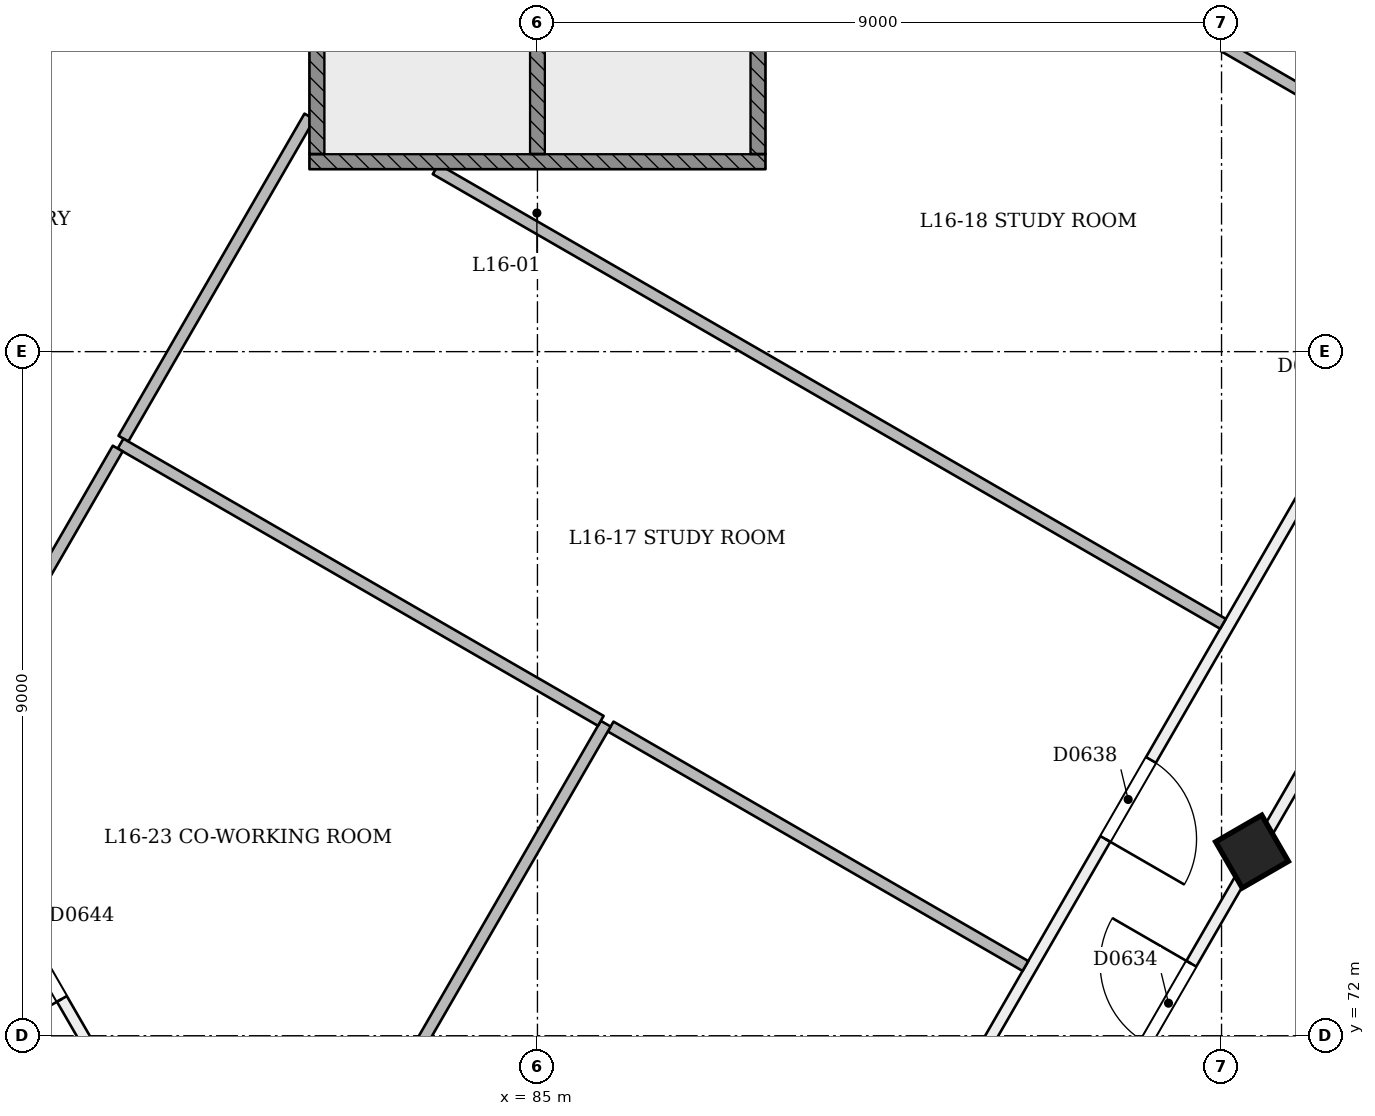
"""IFC4 building model, lengths in metres.
Left out: names, types, materials, properties, quantities, classifications, styles, units other than length and angle.
Written with IfcOpenShell. Run it as: python <this file> out.ifc"""

import sys

from ifc_helpers import new_model, si_unit, direction, frame, frame_2d, origin, origin_2d, place, context, subcontext, project, spatial, rectangle, extrude, element, fill, save


model = new_model("IFC4")
c1 = context("Model", 3, precision=1e-05, world=origin(), true_north=direction((0.0, 1.0)))
c2 = subcontext(c1, "Body", "Model", "MODEL_VIEW")
j1 = project(units=[si_unit("LENGTHUNIT", "METRE"), si_unit("PLANEANGLEUNIT", "RADIAN")], contexts=[c1])
p1 = place(None, origin())
s1 = spatial("IfcSite", under=j1, at=p1, CompositionType="ELEMENT")
p2 = place(p1, origin())
s2 = spatial("IfcBuilding", under=s1, at=p2, CompositionType="ELEMENT")
p3 = place(p2, frame((0.0, 0.0, 66.6)))
s3 = spatial("IfcBuildingStorey", under=s2, at=p3, CompositionType="ELEMENT", Elevation=66.6)
p4 = place(p3, frame((94.428, 74.376, -0.021), z_axis=(-0.022222852987, 0.038483477124, 0.999012095419), x_axis=(-0.500174596178, -0.865639456654, 0.022219460416)))
e1 = element("IfcColumn", 1, at=p4, inside=s3, PredefinedType="COLUMN", context=c2, shape_type="SweptSolid", body=[
    extrude(rectangle(XDim=0.7, YDim=0.7, at=origin_2d()), origin(), (0.0, 0.0, 1.0), 3.604),
])
p5 = place(p3, frame((62.458, 97.093, 0.0), z_axis=(0.0, 0.0, 1.0), x_axis=(0.499998802074, -0.866026095406, 0.0)))
e2 = element("IfcWall", 2, at=p5, inside=s3, PredefinedType="PARTITIONING", context=c2, shape_type="SweptSolid", body=[
    extrude(rectangle(XDim=43.437, YDim=0.15, at=frame_2d((21.719, 0.0))), origin(), (0.0, 0.0, 1.0), 2.7),
])
p6 = place(p5, frame((0.286, 0.0, 0.0)))
e3 = element("IfcOpeningElement", 3, at=p6, cuts=e2, PredefinedType="OPENING", context=c2, shape_type="SweptSolid", body=[
    extrude(rectangle(XDim=1.2, YDim=2.1, at=frame_2d((0.6, 1.05))), frame((0.0, 0.085, 0.0), z_axis=(0.0, -1.0, 0.0), x_axis=(1.0, 0.0, 0.0)), (0.0, 0.0, 1.0), 0.171),
])
p7 = place(p5, frame((12.13, 0.0, 0.0)))
e4 = element("IfcOpeningElement", 4, at=p7, cuts=e2, PredefinedType="OPENING", context=c2, shape_type="SweptSolid", body=[
    extrude(rectangle(XDim=1.2, YDim=2.1, at=frame_2d((0.6, 1.05))), frame((0.0, 0.085, 0.0), z_axis=(0.0, -1.0, 0.0), x_axis=(1.0, 0.0, 0.0)), (0.0, 0.0, 1.0), 0.171),
])
p8 = place(p5, frame((18.98, 0.0, 0.0)))
e5 = element("IfcOpeningElement", 5, at=p8, cuts=e2, PredefinedType="OPENING", context=c2, shape_type="SweptSolid", body=[
    extrude(rectangle(XDim=1.0, YDim=2.1, at=frame_2d((0.5, 1.05))), frame((0.0, 0.085, 0.0), z_axis=(0.0, -1.0, 0.0), x_axis=(1.0, 0.0, 0.0)), (0.0, 0.0, 1.0), 0.171),
])
p9 = place(p5, frame((27.88, 0.0, 0.0)))
e6 = element("IfcOpeningElement", 6, at=p9, cuts=e2, PredefinedType="OPENING", context=c2, shape_type="SweptSolid", body=[
    extrude(rectangle(XDim=1.2, YDim=2.1, at=frame_2d((0.6, 1.05))), frame((0.0, 0.085, 0.0), z_axis=(0.0, -1.0, 0.0), x_axis=(1.0, 0.0, 0.0)), (0.0, 0.0, 1.0), 0.171),
])
p10 = place(p5, frame((38.745, 0.0, 0.0)))
e7 = element("IfcOpeningElement", 7, at=p10, cuts=e2, PredefinedType="OPENING", context=c2, shape_type="SweptSolid", body=[
    extrude(rectangle(XDim=1.2, YDim=2.1, at=frame_2d((0.6, 1.05))), frame((0.0, 0.085, 0.0), z_axis=(0.0, -1.0, 0.0), x_axis=(1.0, 0.0, 0.0)), (0.0, 0.0, 1.0), 0.171),
])
p11 = place(p3, frame((85.824, 59.475, 0.0), z_axis=(0.0, 0.0, 1.0), x_axis=(0.499998498473, 0.86602627069, 0.0)))
e8 = element("IfcWall", 8, at=p11, inside=s3, PredefinedType="PARTITIONING", context=c2, shape_type="SweptSolid", body=[
    extrude(rectangle(XDim=42.924, YDim=0.15, at=frame_2d((21.462, 0.0))), origin(), (0.0, 0.0, 1.0), 2.7),
])
p12 = place(p11, frame((3.492, 0.0, 0.0)))
e9 = element("IfcOpeningElement", 9, at=p12, cuts=e8, PredefinedType="OPENING", context=c2, shape_type="SweptSolid", body=[
    extrude(rectangle(XDim=1.2, YDim=2.1, at=frame_2d((0.6, 1.05))), frame((0.0, 0.085, 0.0), z_axis=(0.0, -1.0, 0.0), x_axis=(1.0, 0.0, 0.0)), (0.0, 0.0, 1.0), 0.171),
])
p13 = place(p11, frame((14.357, 0.0, 0.0)))
e10 = element("IfcOpeningElement", 10, at=p13, cuts=e8, PredefinedType="OPENING", context=c2, shape_type="SweptSolid", body=[
    extrude(rectangle(XDim=1.2, YDim=2.1, at=frame_2d((0.6, 1.05))), frame((0.0, 0.085, 0.0), z_axis=(0.0, -1.0, 0.0), x_axis=(1.0, 0.0, 0.0)), (0.0, 0.0, 1.0), 0.171),
])
p14 = place(p11, frame((27.857, 0.0, 0.0)))
e11 = element("IfcOpeningElement", 11, at=p14, cuts=e8, PredefinedType="OPENING", context=c2, shape_type="SweptSolid", body=[
    extrude(rectangle(XDim=1.2, YDim=2.1, at=frame_2d((0.6, 1.05))), frame((0.0, 0.085, 0.0), z_axis=(0.0, -1.0, 0.0), x_axis=(1.0, 0.0, 0.0)), (0.0, 0.0, 1.0), 0.171),
])
p15 = place(p11, frame((38.721, 0.0, 0.0)))
e12 = element("IfcOpeningElement", 12, at=p15, cuts=e8, PredefinedType="OPENING", context=c2, shape_type="SweptSolid", body=[
    extrude(rectangle(XDim=1.2, YDim=2.1, at=frame_2d((0.6, 1.05))), frame((0.0, 0.085, 0.0), z_axis=(0.0, -1.0, 0.0), x_axis=(1.0, 0.0, 0.0)), (0.0, 0.0, 1.0), 0.171),
])
p16 = place(p3, frame((101.715, 90.6, 0.0), z_axis=(0.0, 0.0, 1.0), x_axis=(-0.499996397115, -0.866027483901, 0.0)))
e13 = element("IfcWall", 13, at=p16, inside=s3, PredefinedType="PARTITIONING", context=c2, shape_type="SweptSolid", body=[
    extrude(rectangle(XDim=33.301, YDim=0.15, at=frame_2d((16.65, 0.0))), origin(), (0.0, 0.0, 1.0), 3.1),
])
p17 = place(p16, frame((17.288, 0.0, 0.0)))
e14 = element("IfcOpeningElement", 14, at=p17, cuts=e13, PredefinedType="OPENING", context=c2, shape_type="SweptSolid", body=[
    extrude(rectangle(XDim=1.2, YDim=2.1, at=frame_2d((0.6, 1.05))), frame((0.0, 0.085, 0.0), z_axis=(0.0, -1.0, 0.0), x_axis=(1.0, 0.0, 0.0)), (0.0, 0.0, 1.0), 0.171),
])
p18 = place(p16, frame((11.374, 0.0, 0.0)))
e15 = element("IfcOpeningElement", 15, at=p18, cuts=e13, PredefinedType="OPENING", context=c2, shape_type="SweptSolid", body=[
    extrude(rectangle(XDim=1.2, YDim=2.1, at=frame_2d((0.6, 1.05))), frame((0.0, 0.085, 0.0), z_axis=(0.0, -1.0, 0.0), x_axis=(1.0, 0.0, 0.0)), (0.0, 0.0, 1.0), 0.171),
])
p19 = place(p16, frame((5.043, 0.0, 0.0)))
e16 = element("IfcOpeningElement", 16, at=p19, cuts=e13, PredefinedType="OPENING", context=c2, shape_type="SweptSolid", body=[
    extrude(rectangle(XDim=1.2, YDim=2.1, at=frame_2d((0.6, 1.05))), frame((0.0, 0.085, 0.0), z_axis=(0.0, -1.0, 0.0), x_axis=(1.0, 0.0, 0.0)), (0.0, 0.0, 1.0), 0.171),
])
p20 = place(p3, frame((85.0, 61.648, 0.0), z_axis=(0.0, 0.0, 1.0), x_axis=(-0.499995543135, 0.866027976941, 0.0)))
e17 = element("IfcWall", 17, at=p20, inside=s3, PredefinedType="PARTITIONING", context=c2, shape_type="SweptSolid", body=[
    extrude(rectangle(XDim=33.431, YDim=0.15, at=frame_2d((16.715, 0.0))), origin(), (0.0, 0.0, 1.0), 3.1),
])
p21 = place(p20, frame((5.719, 0.0, 0.0)))
e18 = element("IfcOpeningElement", 18, at=p21, cuts=e17, PredefinedType="OPENING", context=c2, shape_type="SweptSolid", body=[
    extrude(rectangle(XDim=1.2, YDim=2.1, at=frame_2d((0.6, 1.05))), frame((0.0, 0.085, 0.0), z_axis=(0.0, -1.0, 0.0), x_axis=(1.0, 0.0, 0.0)), (0.0, 0.0, 1.0), 0.171),
])
p22 = place(p20, frame((21.269, 0.0, 0.0)))
e19 = element("IfcOpeningElement", 19, at=p22, cuts=e17, PredefinedType="OPENING", context=c2, shape_type="SweptSolid", body=[
    extrude(rectangle(XDim=1.2, YDim=2.1, at=frame_2d((0.6, 1.05))), frame((0.0, 0.085, 0.0), z_axis=(0.0, -1.0, 0.0), x_axis=(1.0, 0.0, 0.0)), (0.0, 0.0, 1.0), 0.171),
])
p23 = place(p20, frame((27.454, 0.0, 0.0)))
e20 = element("IfcOpeningElement", 20, at=p23, cuts=e17, PredefinedType="OPENING", context=c2, shape_type="SweptSolid", body=[
    extrude(rectangle(XDim=1.2, YDim=2.1, at=frame_2d((0.6, 1.05))), frame((0.0, 0.085, 0.0), z_axis=(0.0, -1.0, 0.0), x_axis=(1.0, 0.0, 0.0)), (0.0, 0.0, 1.0), 0.171),
])
p24 = place(p20, frame((12.513, 0.0, 0.0)))
e21 = element("IfcOpeningElement", 21, at=p24, cuts=e17, PredefinedType="OPENING", context=c2, shape_type="SweptSolid", body=[
    extrude(rectangle(XDim=1.2, YDim=2.1, at=frame_2d((0.6, 1.05))), frame((0.0, 0.085, 0.0), z_axis=(0.0, -1.0, 0.0), x_axis=(1.0, 0.0, 0.0)), (0.0, 0.0, 1.0), 0.171),
])
p25 = place(p3, frame((91.42, 72.917, 0.0), z_axis=(0.0, 0.0, 1.0), x_axis=(-0.866031374414, 0.499989658424, 0.0)))
e22 = element("IfcWall", 22, at=p25, inside=s3, PredefinedType="PARTITIONING", context=c2, shape_type="SweptSolid", body=[
    extrude(rectangle(XDim=6.301, YDim=0.15, at=frame_2d((3.15, 0.0))), origin(), (0.0, 0.0, 1.0), 3.1),
])
p26 = place(p3, frame((85.898, 76.105, 0.0), z_axis=(0.0, 0.0, 1.0), x_axis=(-0.499999124091, -0.86602590949, 0.0)))
e23 = element("IfcWall", 23, at=p26, inside=s3, PredefinedType="PARTITIONING", context=c2, shape_type="SweptSolid", body=[
    extrude(rectangle(XDim=9.115, YDim=0.15, at=frame_2d((4.558, 0.0))), origin(), (0.0, 0.0, 1.0), 3.1),
])
p27 = place(p3, frame((94.019, 77.419, 0.0), z_axis=(0.0, 0.0, 1.0), x_axis=(-0.866025155626, 0.500000429823, 0.0)))
e24 = element("IfcWall", 24, at=p27, inside=s3, PredefinedType="PARTITIONING", context=c2, shape_type="SweptSolid", body=[
    extrude(rectangle(XDim=11.961, YDim=0.15, at=frame_2d((5.981, 0.0))), origin(), (0.0, 0.0, 1.0), 3.1),
])
p28 = place(p3, frame((82.0, 84.094, 0.0), z_axis=(0.0, 0.0, 1.0), x_axis=(-0.500007457698, -0.866021098038, 0.0)))
e25 = element("IfcWall", 25, at=p28, inside=s3, PredefinedType="PARTITIONING", context=c2, shape_type="SweptSolid", body=[
    extrude(rectangle(XDim=4.894, YDim=0.15, at=frame_2d((2.447, 0.0))), origin(), (0.0, 0.0, 1.0), 3.1),
])
p29 = place(p3, frame((79.515, 79.791, 0.0), z_axis=(0.0, 0.0, 1.0), x_axis=(0.866020625573, -0.500008276014, 0.0)))
e26 = element("IfcWall", 26, at=p29, inside=s3, PredefinedType="PARTITIONING", context=c2, shape_type="SweptSolid", body=[
    extrude(rectangle(XDim=7.295, YDim=0.15, at=frame_2d((3.648, 0.0))), origin(), (0.0, 0.0, 1.0), 3.1),
])
p30 = place(p3, frame((97.312, 83.123, 0.0), z_axis=(0.0, 0.0, 1.0), x_axis=(-0.866022617577, 0.500004825822, 0.0)))
e27 = element("IfcWall", 27, at=p30, inside=s3, PredefinedType="PARTITIONING", context=c2, shape_type="SweptSolid", body=[
    extrude(rectangle(XDim=10.752, YDim=0.15, at=frame_2d((5.376, 0.0))), origin(), (0.0, 0.0, 1.0), 3.1),
])
p31 = place(p3, frame((82.0, 89.06, 0.0), z_axis=(0.0, 0.0, 1.0), x_axis=(-0.866027129831, -0.499997010388, 0.0)))
e28 = element("IfcWall", 28, at=p31, inside=s3, PredefinedType="PARTITIONING", context=c2, shape_type="SweptSolid", body=[
    extrude(rectangle(XDim=11.033, YDim=0.15, at=frame_2d((5.516, 0.0))), origin(), (0.0, 0.0, 1.0), 3.1),
])
p32 = place(p3, frame((77.085, 75.582, 0.0), z_axis=(0.0, 0.0, 1.0), x_axis=(0.500002163175, 0.866024154871, 0.0)))
e29 = element("IfcWall", 29, at=p32, inside=s3, PredefinedType="PARTITIONING", context=c2, shape_type="SweptSolid", body=[
    extrude(rectangle(XDim=4.785, YDim=0.15, at=frame_2d((2.393, 0.0))), origin(), (0.0, 0.0, 1.0), 3.1),
])
p33 = place(p3, frame((82.0, 83.5, 0.0), z_axis=(0.0, 0.0, 1.0), x_axis=(1.0, 0.0, 0.0)))
e30 = element("IfcWall", 30, at=p33, inside=s3, PredefinedType="SOLIDWALL", context=c2, shape_type="SweptSolid", body=[
    extrude(rectangle(XDim=6.0, YDim=0.2, at=frame_2d((3.0, 0.0))), origin(), (0.0, 0.0, 1.0), 3.1),
])
for number, where, z_axis, x_axis in (
    (31, (82.1, 83.6, 0.0), (0.0, 0.0, 1.0), (0.0, 1.0, 0.0)),
    (32, (87.9, 83.6, 0.0), (0.0, 0.0, 1.0), (0.0, 1.0, 0.0)),
    (33, (85.0, 83.6, 0.0), (0.0, 0.0, 1.0), (0.0, 1.0, 0.0)),
):
    element("IfcWall", number, at=place(p3, frame(where, z_axis=z_axis, x_axis=x_axis)), inside=s3, PredefinedType="SOLIDWALL", context=c2, shape_type="SweptSolid", body=[
        extrude(rectangle(XDim=6.8, YDim=0.2, at=frame_2d((3.4, 0.0))), origin(), (0.0, 0.0, 1.0), 3.1),
    ])
p34 = place(p13, origin())
e34 = element("IfcDoor", 34, at=p34, inside=s3, OperationType="SINGLE_SWING_RIGHT", PredefinedType="NOTDEFINED", context=c2, shape_type="SweptSolid", body=[
    extrude(rectangle(XDim=1.2, YDim=2.1, at=frame_2d((0.6, 1.05))), frame((0.0, 0.025, 0.0), z_axis=(0.0, -1.0, 0.0), x_axis=(1.0, 0.0, 0.0)), (0.0, 0.0, 1.0), 0.05),
])
fill(e10, e34)
p35 = place(p17, origin())
e35 = element("IfcDoor", 35, at=p35, inside=s3, OperationType="SINGLE_SWING_RIGHT", PredefinedType="NOTDEFINED", context=c2, shape_type="SweptSolid", body=[
    extrude(rectangle(XDim=1.2, YDim=2.1, at=frame_2d((0.6, 1.05))), frame((0.0, 0.025, 0.0), z_axis=(0.0, -1.0, 0.0), x_axis=(1.0, 0.0, 0.0)), (0.0, 0.0, 1.0), 0.05),
])
fill(e14, e35)
p36 = place(p24, origin())
e36 = element("IfcDoor", 36, at=p36, inside=s3, OperationType="SINGLE_SWING_LEFT", PredefinedType="NOTDEFINED", context=c2, shape_type="SweptSolid", body=[
    extrude(rectangle(XDim=1.2, YDim=2.1, at=frame_2d((0.6, 1.05))), frame((0.0, 0.025, 0.0), z_axis=(0.0, -1.0, 0.0), x_axis=(1.0, 0.0, 0.0)), (0.0, 0.0, 1.0), 0.05),
])
fill(e21, e36)
save(model, sys.argv[1])
